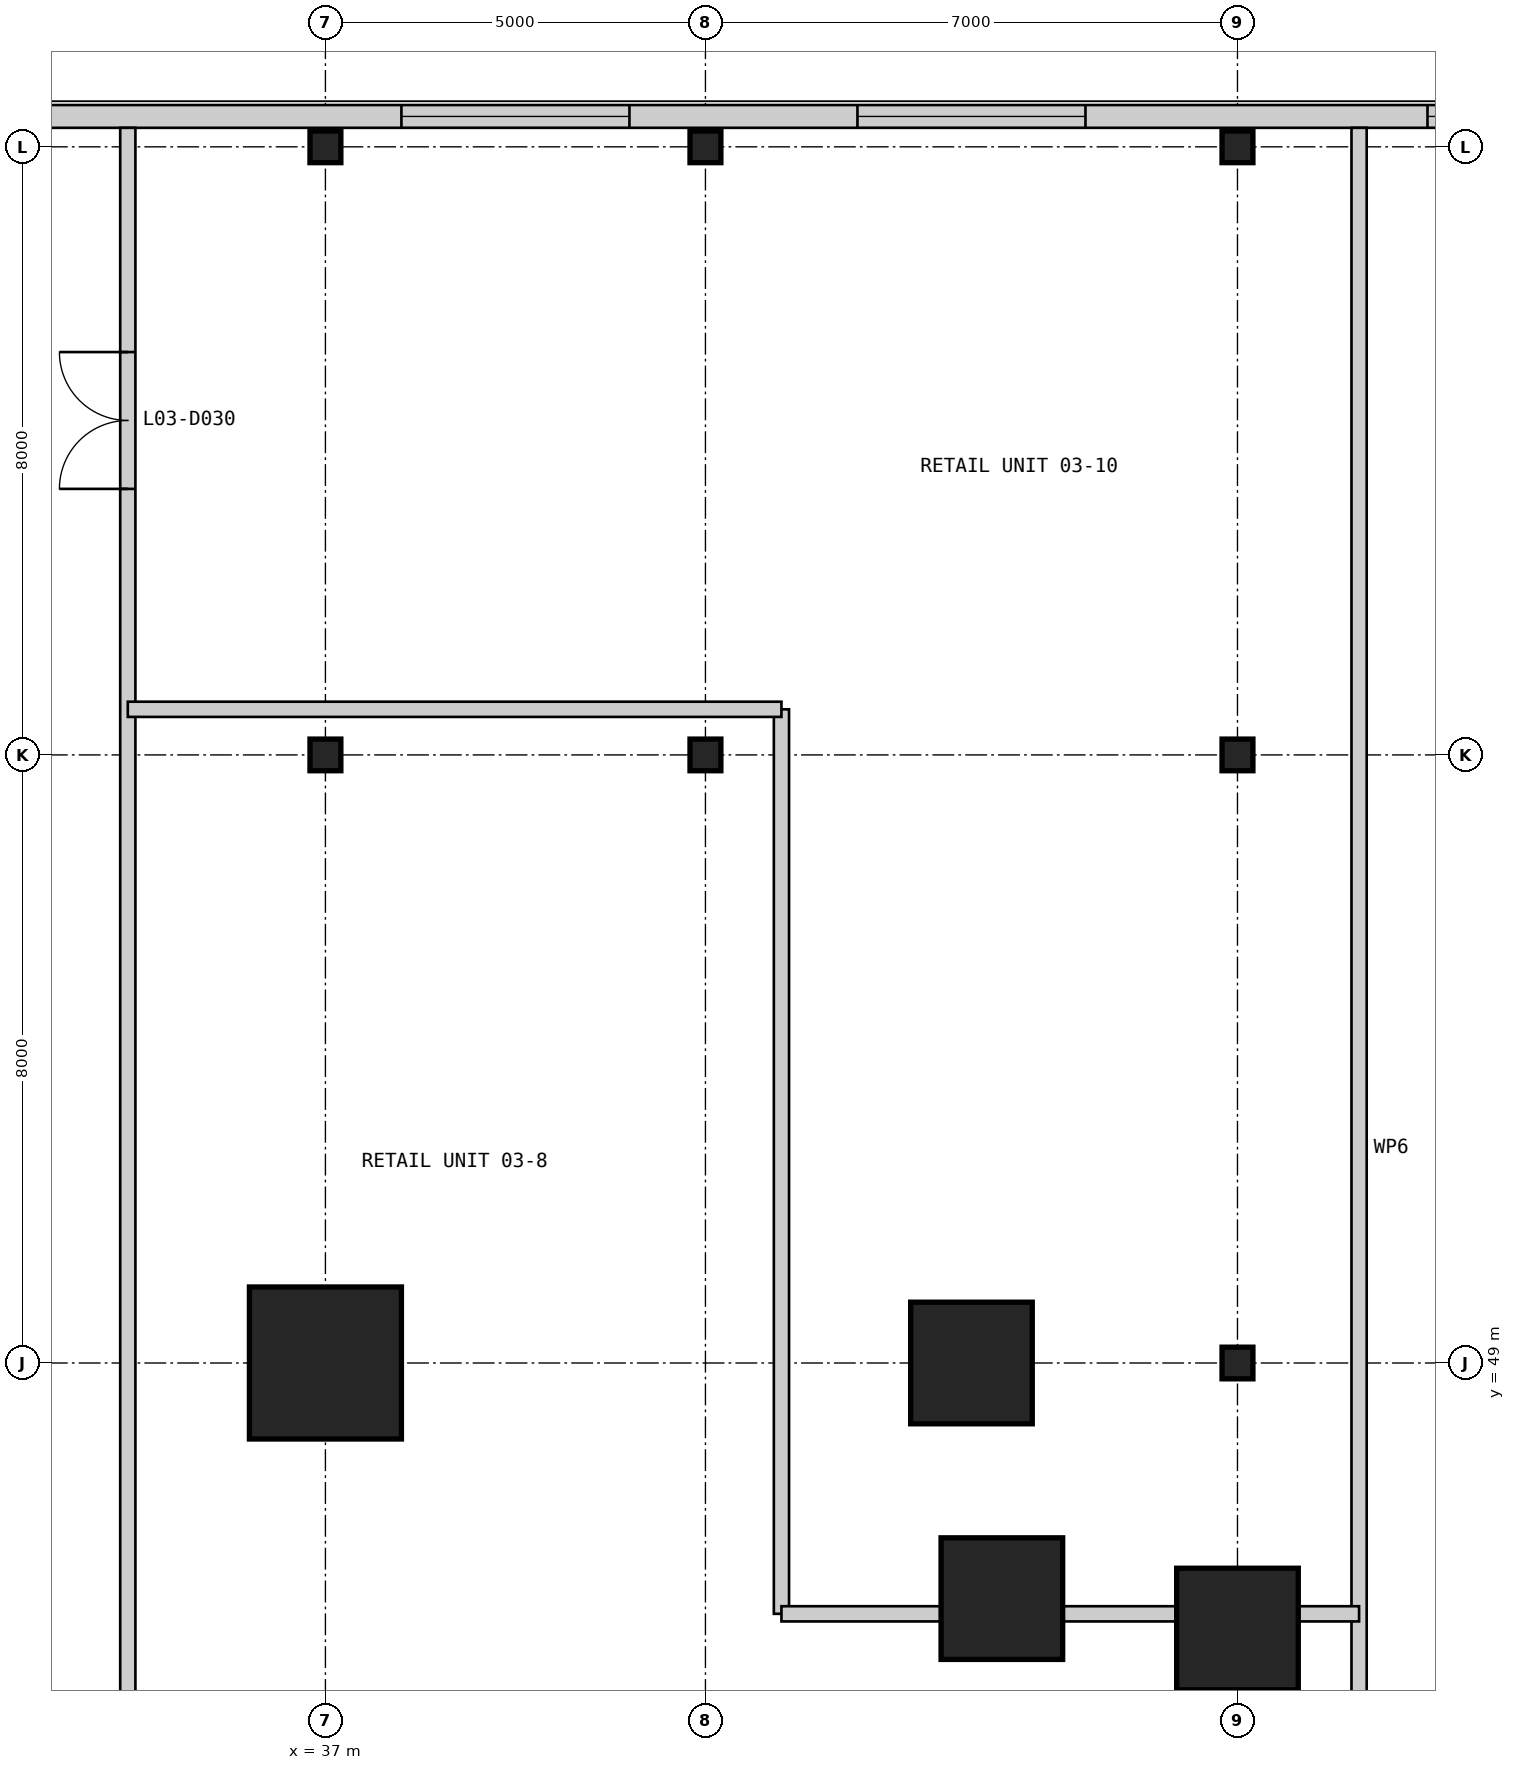
"""IFC4 building model, lengths in metres.
Left out: names, types, materials, properties, quantities, classifications, styles, units other than length and angle.
Written with IfcOpenShell. Run it as: python <this file> out.ifc"""

import sys

from ifc_helpers import new_model, si_unit, direction, frame, frame_2d, origin, origin_2d, place, context, subcontext, project, spatial, rectangle, i_section, extrude, element, fill, save


model = new_model("IFC4")
c1 = context("Model", 3, precision=1e-05, world=origin(), true_north=direction((0.0, 1.0)))
c2 = subcontext(c1, "Body", "Model", "MODEL_VIEW")
j1 = project(units=[si_unit("LENGTHUNIT", "METRE"), si_unit("PLANEANGLEUNIT", "RADIAN")], contexts=[c1])
p1 = place(None, origin())
s1 = spatial("IfcSite", under=j1, at=p1, CompositionType="ELEMENT")
p2 = place(p1, origin())
s2 = spatial("IfcBuilding", under=s1, at=p2, CompositionType="ELEMENT")
p3 = place(p2, frame((0.0, 0.0, 16.6)))
s3 = spatial("IfcBuildingStorey", under=s2, at=p3, CompositionType="ELEMENT", Elevation=16.6)
for number, where, z_axis, x_axis in (
    (1, (49.0, 45.5, 0.0), (0.0, 0.0, 1.0), (1.0, 0.0, 0.0)),
    (2, (45.9, 45.9, 0.0), (0.0, 0.0, 1.0), (1.0, 0.0, 0.0)),
    (3, (45.5, 49.0, 0.0), (0.0, 0.0, 1.0), (1.0, 0.0, 0.0)),
):
    element("IfcColumn", number, at=place(p3, frame(where, z_axis=z_axis, x_axis=x_axis)), inside=s3, PredefinedType="COLUMN", context=c2, shape_type="SweptSolid", body=[
        extrude(rectangle(XDim=1.6, YDim=1.6, at=origin_2d()), origin(), (0.0, 0.0, 1.0), 4.8),
    ])
p4 = place(p3, frame((37.0, 49.0, 0.0), z_axis=(0.0, 0.0, 1.0), x_axis=(1.0, 0.0, 0.0)))
e4 = element("IfcColumn", 4, at=p4, inside=s3, PredefinedType="COLUMN", context=c2, shape_type="SweptSolid", body=[
    extrude(rectangle(XDim=2.0, YDim=2.0, at=origin_2d()), origin(), (0.0, 0.0, 1.0), 4.8),
])
for number, where, z_axis, x_axis in (
    (5, (37.0, 57.0, 0.0), (0.0, 0.0, 1.0), (1.0, 0.0, 0.0)),
    (6, (37.0, 65.0, 0.0), (0.0, 0.0, 1.0), (1.0, 0.0, 0.0)),
    (7, (42.0, 57.0, 0.0), (0.0, 0.0, 1.0), (1.0, 0.0, 0.0)),
    (8, (42.0, 65.0, 0.0), (0.0, 0.0, 1.0), (1.0, 0.0, 0.0)),
    (9, (49.0, 49.0, 0.0), (0.0, 0.0, 1.0), (1.0, 0.0, 0.0)),
    (10, (49.0, 57.0, 0.0), (0.0, 0.0, 1.0), (1.0, 0.0, 0.0)),
    (11, (49.0, 65.0, 0.0), (0.0, 0.0, 1.0), (1.0, 0.0, 0.0)),
):
    element("IfcColumn", number, at=place(p3, frame(where, z_axis=z_axis, x_axis=x_axis)), inside=s3, PredefinedType="COLUMN", context=c2, shape_type="SweptSolid", body=[
        extrude(i_section(OverallWidth=0.406, OverallDepth=0.417, WebThickness=0.03, FlangeThickness=0.048, at=origin_2d()), origin(), (0.0, 0.0, 1.0), 4.8),
    ])
p5 = place(p3, frame((57.55, 65.4, 0.0), z_axis=(0.0, 0.0, 1.0), x_axis=(-1.0, 0.0, 0.0)))
e12 = element("IfcWall", 12, at=p5, inside=s3, PredefinedType="SOLIDWALL", context=c2, shape_type="SweptSolid", body=[
    extrude(rectangle(XDim=73.1, YDim=0.3, at=frame_2d((36.55, 0.0))), origin(), (0.0, 0.0, 1.0), 4.5),
])
p6 = place(p5, frame((67.05, 0.0, 0.9)))
e13 = element("IfcOpeningElement", 13, at=p6, cuts=e12, PredefinedType="OPENING", context=c2, shape_type="SweptSolid", body=[
    extrude(rectangle(XDim=3.0, YDim=2.4, at=frame_2d((1.5, 1.2))), frame((0.0, 0.16, 0.0), z_axis=(0.0, -1.0, 0.0), x_axis=(1.0, 0.0, 0.0)), (0.0, 0.0, 1.0), 0.32),
])
p7 = place(p5, frame((59.05, 0.0, 0.9)))
e14 = element("IfcOpeningElement", 14, at=p7, cuts=e12, PredefinedType="OPENING", context=c2, shape_type="SweptSolid", body=[
    extrude(rectangle(XDim=3.0, YDim=2.4, at=frame_2d((1.5, 1.2))), frame((0.0, 0.16, 0.0), z_axis=(0.0, -1.0, 0.0), x_axis=(1.0, 0.0, 0.0)), (0.0, 0.0, 1.0), 0.32),
])
p8 = place(p5, frame((51.05, 0.0, 0.9)))
e15 = element("IfcOpeningElement", 15, at=p8, cuts=e12, PredefinedType="OPENING", context=c2, shape_type="SweptSolid", body=[
    extrude(rectangle(XDim=3.0, YDim=2.4, at=frame_2d((1.5, 1.2))), frame((0.0, 0.16, 0.0), z_axis=(0.0, -1.0, 0.0), x_axis=(1.0, 0.0, 0.0)), (0.0, 0.0, 1.0), 0.32),
])
p9 = place(p5, frame((37.05, 0.0, 0.9)))
e16 = element("IfcOpeningElement", 16, at=p9, cuts=e12, PredefinedType="OPENING", context=c2, shape_type="SweptSolid", body=[
    extrude(rectangle(XDim=3.0, YDim=2.4, at=frame_2d((1.5, 1.2))), frame((0.0, 0.16, 0.0), z_axis=(0.0, -1.0, 0.0), x_axis=(1.0, 0.0, 0.0)), (0.0, 0.0, 1.0), 0.32),
])
p10 = place(p5, frame((25.05, 0.0, 0.9)))
e17 = element("IfcOpeningElement", 17, at=p10, cuts=e12, PredefinedType="OPENING", context=c2, shape_type="SweptSolid", body=[
    extrude(rectangle(XDim=3.0, YDim=2.4, at=frame_2d((1.5, 1.2))), frame((0.0, 0.16, 0.0), z_axis=(0.0, -1.0, 0.0), x_axis=(1.0, 0.0, 0.0)), (0.0, 0.0, 1.0), 0.32),
])
p11 = place(p5, frame((16.55, 0.0, 0.9)))
e18 = element("IfcOpeningElement", 18, at=p11, cuts=e12, PredefinedType="OPENING", context=c2, shape_type="SweptSolid", body=[
    extrude(rectangle(XDim=3.0, YDim=2.4, at=frame_2d((1.5, 1.2))), frame((0.0, 0.16, 0.0), z_axis=(0.0, -1.0, 0.0), x_axis=(1.0, 0.0, 0.0)), (0.0, 0.0, 1.0), 0.32),
])
p12 = place(p5, frame((10.55, 0.0, 0.9)))
e19 = element("IfcOpeningElement", 19, at=p12, cuts=e12, PredefinedType="OPENING", context=c2, shape_type="SweptSolid", body=[
    extrude(rectangle(XDim=3.0, YDim=2.4, at=frame_2d((1.5, 1.2))), frame((0.0, 0.16, 0.0), z_axis=(0.0, -1.0, 0.0), x_axis=(1.0, 0.0, 0.0)), (0.0, 0.0, 1.0), 0.32),
])
p13 = place(p5, frame((3.05, 0.0, 0.9)))
e20 = element("IfcOpeningElement", 20, at=p13, cuts=e12, PredefinedType="OPENING", context=c2, shape_type="SweptSolid", body=[
    extrude(rectangle(XDim=3.0, YDim=2.4, at=frame_2d((1.5, 1.2))), frame((0.0, 0.16, 0.0), z_axis=(0.0, -1.0, 0.0), x_axis=(1.0, 0.0, 0.0)), (0.0, 0.0, 1.0), 0.32),
])
p14 = place(p3, frame((34.4, 43.0, 0.0), z_axis=(0.0, 0.0, 1.0), x_axis=(0.0, 1.0, 0.0)))
e21 = element("IfcWall", 21, at=p14, inside=s3, PredefinedType="PARTITIONING", context=c2, shape_type="SweptSolid", body=[
    extrude(rectangle(XDim=22.25, YDim=0.2, at=frame_2d((11.125, 0.0))), origin(), (0.0, 0.0, 1.0), 4.5),
])
p15 = place(p14, frame((17.5, 0.0, 0.0)))
e22 = element("IfcOpeningElement", 22, at=p15, cuts=e21, PredefinedType="OPENING", context=c2, shape_type="SweptSolid", body=[
    extrude(rectangle(XDim=1.8, YDim=2.4, at=frame_2d((0.9, 1.2))), frame((0.0, 0.11, 0.0), z_axis=(0.0, -1.0, 0.0), x_axis=(1.0, 0.0, 0.0)), (0.0, 0.0, 1.0), 0.22),
])
p16 = place(p3, frame((43.0, 45.7, 0.0), z_axis=(0.0, 0.0, 1.0), x_axis=(0.0, 1.0, 0.0)))
e23 = element("IfcWall", 23, at=p16, inside=s3, PredefinedType="PARTITIONING", context=c2, shape_type="SweptSolid", body=[
    extrude(rectangle(XDim=11.9, YDim=0.2, at=frame_2d((5.95, 0.0))), origin(), (0.0, 0.0, 1.0), 4.5),
])
p17 = place(p3, frame((50.6, 38.4, 0.0), z_axis=(0.0, 0.0, 1.0), x_axis=(0.0, 1.0, 0.0)))
e24 = element("IfcWall", 24, at=p17, inside=s3, PredefinedType="PARTITIONING", context=c2, shape_type="SweptSolid", body=[
    extrude(rectangle(XDim=26.85, YDim=0.2, at=frame_2d((13.425, 0.0))), origin(), (0.0, 0.0, 1.0), 4.5),
])
p18 = place(p3, frame((43.0, 45.7, 0.0), z_axis=(0.0, 0.0, 1.0), x_axis=(1.0, 0.0, 0.0)))
e25 = element("IfcWall", 25, at=p18, inside=s3, PredefinedType="PARTITIONING", context=c2, shape_type="SweptSolid", body=[
    extrude(rectangle(XDim=2.1, YDim=0.2, at=frame_2d((1.05, 0.0))), origin(), (0.0, 0.0, 1.0), 4.5),
])
p19 = place(p3, frame((46.7, 45.7, 0.0), z_axis=(0.0, 0.0, 1.0), x_axis=(1.0, 0.0, 0.0)))
e26 = element("IfcWall", 26, at=p19, inside=s3, PredefinedType="PARTITIONING", context=c2, shape_type="SweptSolid", body=[
    extrude(rectangle(XDim=1.5, YDim=0.2, at=frame_2d((0.75, 0.0))), origin(), (0.0, 0.0, 1.0), 3.65),
])
p20 = place(p3, frame((49.8, 45.7, 0.0), z_axis=(0.0, 0.0, 1.0), x_axis=(1.0, 0.0, 0.0)))
e27 = element("IfcWall", 27, at=p20, inside=s3, PredefinedType="PARTITIONING", context=c2, shape_type="SweptSolid", body=[
    extrude(rectangle(XDim=0.8, YDim=0.2, at=frame_2d((0.4, 0.0))), origin(), (0.0, 0.0, 1.0), 4.5),
])
p21 = place(p3, frame((34.4, 57.6, 0.0), z_axis=(0.0, 0.0, 1.0), x_axis=(1.0, 0.0, 0.0)))
e28 = element("IfcWall", 28, at=p21, inside=s3, PredefinedType="PARTITIONING", context=c2, shape_type="SweptSolid", body=[
    extrude(rectangle(XDim=8.6, YDim=0.2, at=frame_2d((4.3, 0.0))), origin(), (0.0, 0.0, 1.0), 4.5),
])
p22 = place(p11, origin())
e29 = element("IfcWindow", 29, at=p22, inside=s3, PartitioningType="SINGLE_PANEL", PredefinedType="WINDOW", context=c2, shape_type="SweptSolid", body=[
    extrude(rectangle(XDim=3.0, YDim=2.4, at=frame_2d((1.5, 1.2))), frame((0.0, 0.03, 0.0), z_axis=(0.0, -1.0, 0.0), x_axis=(1.0, 0.0, 0.0)), (0.0, 0.0, 1.0), 0.06),
])
fill(e18, e29)
p23 = place(p12, origin())
e30 = element("IfcWindow", 30, at=p23, inside=s3, PartitioningType="SINGLE_PANEL", PredefinedType="WINDOW", context=c2, shape_type="SweptSolid", body=[
    extrude(rectangle(XDim=3.0, YDim=2.4, at=frame_2d((1.5, 1.2))), frame((0.0, 0.03, 0.0), z_axis=(0.0, -1.0, 0.0), x_axis=(1.0, 0.0, 0.0)), (0.0, 0.0, 1.0), 0.06),
])
fill(e19, e30)
p24 = place(p13, origin())
e31 = element("IfcWindow", 31, at=p24, inside=s3, PartitioningType="SINGLE_PANEL", PredefinedType="WINDOW", context=c2, shape_type="SweptSolid", body=[
    extrude(rectangle(XDim=3.0, YDim=2.4, at=frame_2d((1.5, 1.2))), frame((0.0, 0.03, 0.0), z_axis=(0.0, -1.0, 0.0), x_axis=(1.0, 0.0, 0.0)), (0.0, 0.0, 1.0), 0.06),
])
fill(e20, e31)
p25 = place(p15, origin())
e32 = element("IfcDoor", 32, at=p25, inside=s3, OperationType="DOUBLE_DOOR_SINGLE_SWING", PredefinedType="DOOR", context=c2, shape_type="SweptSolid", body=[
    extrude(rectangle(XDim=1.8, YDim=2.4, at=frame_2d((0.9, 1.2))), frame((0.0, 0.025, 0.0), z_axis=(0.0, -1.0, 0.0), x_axis=(1.0, 0.0, 0.0)), (0.0, 0.0, 1.0), 0.05),
])
fill(e22, e32)
save(model, sys.argv[1])
